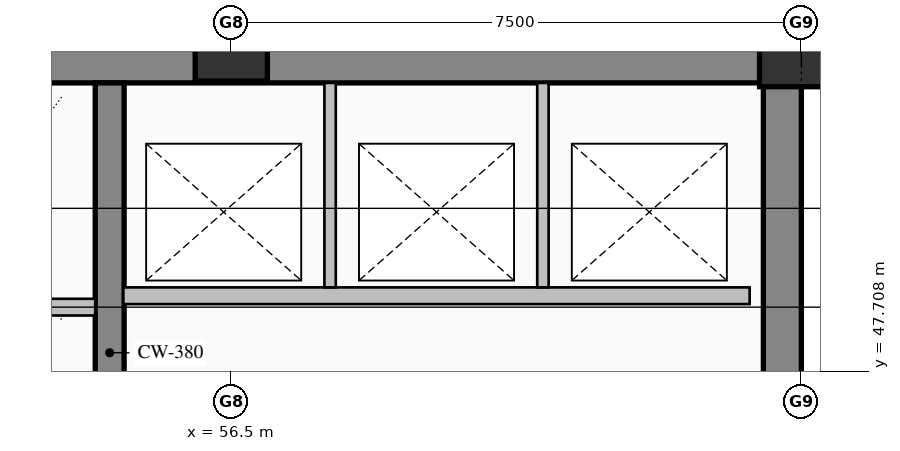
"""IFC4 building model, lengths in metres.
Left out: names, types, materials, properties, quantities, classifications, styles, units other than length and angle.
Written with IfcOpenShell. Run it as: python <this file> out.ifc"""

import sys

from ifc_helpers import new_model, si_unit, direction, frame, frame_2d, origin, origin_2d, place, context, subcontext, project, spatial, rectangle, hollow_rectangle, extrude, element, save


model = new_model("IFC4")
c1 = context("Model", 3, precision=1e-05, world=origin(), true_north=direction((0.0, 1.0)))
c2 = subcontext(c1, "Body", "Model", "MODEL_VIEW")
j1 = project(units=[si_unit("LENGTHUNIT", "METRE"), si_unit("PLANEANGLEUNIT", "RADIAN")], contexts=[c1])
p1 = place(None, origin())
s1 = spatial("IfcSite", under=j1, at=p1, CompositionType="ELEMENT")
p2 = place(p1, origin())
s2 = spatial("IfcBuilding", under=s1, at=p2, CompositionType="ELEMENT")
p3 = place(p2, frame((0.0, 0.0, 163.0)))
s3 = spatial("IfcBuildingStorey", under=s2, at=p3, CompositionType="ELEMENT", Elevation=163.0)
p4 = place(p3, frame((40.5, 51.75, 0.0), z_axis=(0.0, 0.0, 1.0), x_axis=(1.0, 0.0, 0.0)))
e1 = element("IfcWall", 1, at=p4, inside=s3, PredefinedType="SHEAR", context=c2, shape_type="SweptSolid", body=[
    extrude(rectangle(XDim=23.5, YDim=0.5, at=frame_2d((11.75, 0.0))), origin(), (0.0, 0.0, 1.0), 3.765),
])
p5 = place(p3, frame((63.75, 36.32, 0.0), z_axis=(0.0, 0.0, 1.0), x_axis=(0.0, 1.0, 0.0)))
e2 = element("IfcWall", 2, at=p5, inside=s3, PredefinedType="SHEAR", context=c2, shape_type="SweptSolid", body=[
    extrude(rectangle(XDim=15.18, YDim=0.5, at=frame_2d((7.59, 0.0))), origin(), (0.0, 0.0, 1.0), 3.765),
])
p6 = place(p3, frame((54.9, 44.4, 0.0), z_axis=(0.0, 0.0, 1.0), x_axis=(0.0, 1.0, 0.0)))
e3 = element("IfcWall", 3, at=p6, inside=s3, PredefinedType="SHEAR", context=c2, shape_type="SweptSolid", body=[
    extrude(rectangle(XDim=7.1, YDim=0.38, at=frame_2d((3.55, 0.0))), origin(), (0.0, 0.0, 1.0), 3.765),
])
p7 = place(p3, frame((56.5, 52.0, 0.0), z_axis=(0.0, 0.0, 1.0), x_axis=(1.0, 0.0, 0.0)))
e4 = element("IfcColumn", 4, at=p7, inside=s3, PredefinedType="COLUMN", context=c2, shape_type="SweptSolid", body=[
    extrude(hollow_rectangle(XDim=0.95, YDim=0.95, WallThickness=0.036, at=origin_2d()), origin(), (0.0, 0.0, 1.0), 4.0),
])
p8 = place(p3, frame((64.0, 52.0, 0.0), z_axis=(0.0, 0.0, 1.0), x_axis=(1.0, 0.0, 0.0)))
e5 = element("IfcColumn", 5, at=p8, inside=s3, PredefinedType="COLUMN", context=c2, shape_type="SweptSolid", body=[
    extrude(hollow_rectangle(XDim=1.1, YDim=1.1, WallThickness=0.04, at=origin_2d()), origin(), (0.0, 0.0, 1.0), 4.0),
])
p9 = place(p3, frame((54.71, 48.55, 0.0), z_axis=(0.0, 0.0, 1.0), x_axis=(-1.0, 0.0, 0.0)))
e6 = element("IfcWall", 6, at=p9, inside=s3, PredefinedType="PARTITIONING", context=c2, shape_type="SweptSolid", body=[
    extrude(rectangle(XDim=5.12, YDim=0.22, at=frame_2d((2.56, 0.0))), origin(), (0.0, 0.0, 1.0), 3.765),
])
p10 = place(p9, frame((3.735, 0.0, 0.0)))
e7 = element("IfcOpeningElement", 7, at=p10, cuts=e6, PredefinedType="OPENING", context=c2, shape_type="SweptSolid", body=[
    extrude(rectangle(XDim=1.15, YDim=2.2, at=frame_2d((0.575, 1.1))), frame((0.0, 0.12, 0.0), z_axis=(0.0, -1.0, 0.0), x_axis=(1.0, 0.0, 0.0)), (0.0, 0.0, 1.0), 0.24),
])
p11 = place(p9, frame((0.935, 0.0, 0.0)))
e8 = element("IfcOpeningElement", 8, at=p11, cuts=e6, PredefinedType="OPENING", context=c2, shape_type="SweptSolid", body=[
    extrude(rectangle(XDim=1.15, YDim=2.2, at=frame_2d((0.575, 1.1))), frame((0.0, 0.12, 0.0), z_axis=(0.0, -1.0, 0.0), x_axis=(1.0, 0.0, 0.0)), (0.0, 0.0, 1.0), 0.24),
])
p12 = place(p3, frame((63.32, 48.7, 0.0), z_axis=(0.0, 0.0, 1.0), x_axis=(-1.0, 0.0, 0.0)))
e9 = element("IfcWall", 9, at=p12, inside=s3, PredefinedType="PARTITIONING", context=c2, shape_type="SweptSolid", body=[
    extrude(rectangle(XDim=8.24, YDim=0.22, at=frame_2d((4.12, 0.0))), origin(), (0.0, 0.0, 1.0), 3.765),
])
for number, where, z_axis, x_axis in (
    (10, (57.8, 48.81, 0.0), (0.0, 0.0, 1.0), (0.0, 1.0, 0.0)),
    (11, (60.6, 48.81, 0.0), (0.0, 0.0, 1.0), (0.0, 1.0, 0.0)),
):
    element("IfcWall", number, at=place(p3, frame(where, z_axis=z_axis, x_axis=x_axis)), inside=s3, PredefinedType="PARTITIONING", context=c2, shape_type="SweptSolid", body=[
        extrude(rectangle(XDim=2.69, YDim=0.15, at=frame_2d((1.345, 0.0))), origin(), (0.0, 0.0, 1.0), 3.765),
    ])
save(model, sys.argv[1])
